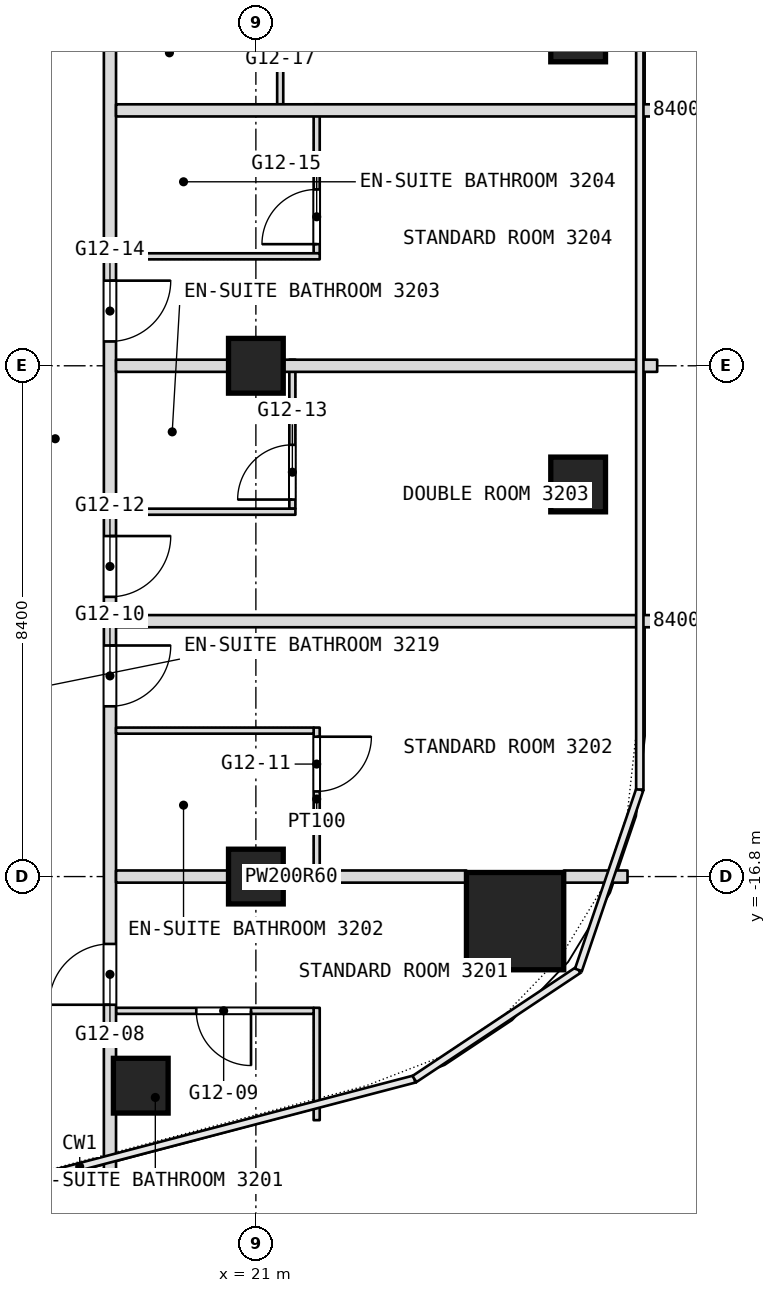
"""IFC4 building model, lengths in metres.
Left out: names, types, materials, properties, quantities, classifications, styles, units other than length and angle.
Written with IfcOpenShell. Run it as: python <this file> out.ifc"""

import sys

from ifc_helpers import new_model, si_unit, direction, frame, frame_2d, origin, origin_2d, place, context, subcontext, project, spatial, rectangle, extrude, element, fill, save


model = new_model("IFC4")
c1 = context("Model", 3, precision=1e-05, world=origin(), true_north=direction((0.0, 1.0)))
c2 = subcontext(c1, "Body", "Model", "MODEL_VIEW")
j1 = project(units=[si_unit("LENGTHUNIT", "METRE"), si_unit("PLANEANGLEUNIT", "RADIAN")], contexts=[c1])
p1 = place(None, origin())
s1 = spatial("IfcSite", under=j1, at=p1, CompositionType="ELEMENT")
p2 = place(p1, origin())
s2 = spatial("IfcBuilding", under=s1, at=p2, CompositionType="ELEMENT")
p3 = place(p2, frame((0.0, 0.0, 140.9)))
s3 = spatial("IfcBuildingStorey", under=s2, at=p3, CompositionType="ELEMENT", Elevation=140.9)
p4 = place(p3, frame((25.263, -17.533, 0.0), z_axis=(0.0, 0.0, 1.0), x_axis=(1.0, 0.0, 0.0)))
e1 = element("IfcColumn", 1, at=p4, inside=s3, PredefinedType="COLUMN", context=c2, shape_type="SweptSolid", body=[
    extrude(rectangle(XDim=1.6, YDim=1.6, at=origin_2d()), origin(), (0.0, 0.0, 1.0), 3.6),
])
for number, where, z_axis, x_axis in (
    (2, (21.0, -16.8, 0.0), (0.0, 0.0, 1.0), (1.0, 0.0, 0.0)),
    (3, (21.0, -8.4, 0.0), (0.0, 0.0, 1.0), (1.0, 0.0, 0.0)),
    (4, (26.3, -2.951, 0.0), (0.0, 0.0, 1.0), (1.0, 0.0, 0.0)),
    (5, (26.3, -10.352, 0.0), (0.0, 0.0, 1.0), (1.0, 0.0, 0.0)),
    (6, (19.107, -20.239, 0.0), (0.0, 0.0, 1.0), (1.0, 0.0, 0.0)),
):
    element("IfcColumn", number, at=place(p3, frame(where, z_axis=z_axis, x_axis=x_axis)), inside=s3, PredefinedType="COLUMN", context=c2, shape_type="SweptSolid", body=[
        extrude(rectangle(XDim=0.9, YDim=0.9, at=origin_2d()), origin(), (0.0, 0.0, 1.0), 3.6),
    ])
p5 = place(p3, frame((22.0, -20.806, 0.0), z_axis=(0.0, 0.0, 1.0), x_axis=(0.0, 1.0, 0.0)))
e7 = element("IfcWall", 7, at=p5, inside=s3, PredefinedType="PARTITIONING", context=c2, shape_type="SweptSolid", body=[
    extrude(rectangle(XDim=1.848, YDim=0.1, at=frame_2d((0.924, 0.0))), origin(), (0.0, 0.0, 1.0), 3.34),
])
p6 = place(p3, frame((22.0, -16.7, 0.0), z_axis=(0.0, 0.0, 1.0), x_axis=(0.0, 1.0, 0.0)))
e8 = element("IfcWall", 8, at=p6, inside=s3, PredefinedType="PARTITIONING", context=c2, shape_type="SweptSolid", body=[
    extrude(rectangle(XDim=2.35, YDim=0.1, at=frame_2d((1.175, 0.0))), origin(), (0.0, 0.0, 1.0), 3.34),
])
p7 = place(p6, frame((1.3, 0.0, 0.0)))
e9 = element("IfcOpeningElement", 9, at=p7, cuts=e8, PredefinedType="OPENING", context=c2, shape_type="SweptSolid", body=[
    extrude(rectangle(XDim=0.9, YDim=2.1, at=frame_2d((0.45, 1.05))), frame((0.0, 0.05, 0.0), z_axis=(0.0, -1.0, 0.0), x_axis=(1.0, 0.0, 0.0)), (0.0, 0.0, 1.0), 0.1),
])
p8 = place(p3, frame((22.0, -6.55, 0.0), z_axis=(0.0, 0.0, 1.0), x_axis=(0.0, 1.0, 0.0)))
e10 = element("IfcWall", 10, at=p8, inside=s3, PredefinedType="PARTITIONING", context=c2, shape_type="SweptSolid", body=[
    extrude(rectangle(XDim=2.45, YDim=0.1, at=frame_2d((1.225, 0.0))), origin(), (0.0, 0.0, 1.0), 3.34),
])
p9 = place(p8, frame((0.15, 0.0, 0.0)))
e11 = element("IfcOpeningElement", 11, at=p9, cuts=e10, PredefinedType="OPENING", context=c2, shape_type="SweptSolid", body=[
    extrude(rectangle(XDim=0.9, YDim=2.1, at=frame_2d((0.45, 1.05))), frame((0.0, 0.05, 0.0), z_axis=(0.0, -1.0, 0.0), x_axis=(1.0, 0.0, 0.0)), (0.0, 0.0, 1.0), 0.1),
])
p10 = place(p3, frame((21.6, -10.75, 0.0), z_axis=(0.0, 0.0, 1.0), x_axis=(0.0, 1.0, 0.0)))
e12 = element("IfcWall", 12, at=p10, inside=s3, PredefinedType="PARTITIONING", context=c2, shape_type="SweptSolid", body=[
    extrude(rectangle(XDim=2.45, YDim=0.1, at=frame_2d((1.225, 0.0))), origin(), (0.0, 0.0, 1.0), 3.34),
])
p11 = place(p10, frame((0.15, 0.0, 0.0)))
e13 = element("IfcOpeningElement", 13, at=p11, cuts=e12, PredefinedType="OPENING", context=c2, shape_type="SweptSolid", body=[
    extrude(rectangle(XDim=0.9, YDim=2.1, at=frame_2d((0.45, 1.05))), frame((0.0, 0.05, 0.0), z_axis=(0.0, -1.0, 0.0), x_axis=(1.0, 0.0, 0.0)), (0.0, 0.0, 1.0), 0.1),
])
p12 = place(p3, frame((21.4, -4.1, 0.0), z_axis=(0.0, 0.0, 1.0), x_axis=(0.0, 1.0, 0.0)))
e14 = element("IfcWall", 14, at=p12, inside=s3, PredefinedType="PARTITIONING", context=c2, shape_type="SweptSolid", body=[
    extrude(rectangle(XDim=2.35, YDim=0.1, at=frame_2d((1.175, 0.0))), origin(), (0.0, 0.0, 1.0), 3.34),
])
p13 = place(p12, frame((1.3, 0.0, 0.0)))
e15 = element("IfcOpeningElement", 15, at=p13, cuts=e14, PredefinedType="OPENING", context=c2, shape_type="SweptSolid", body=[
    extrude(rectangle(XDim=0.9, YDim=2.1, at=frame_2d((0.45, 1.05))), frame((0.0, 0.05, 0.0), z_axis=(0.0, -1.0, 0.0), x_axis=(1.0, 0.0, 0.0)), (0.0, 0.0, 1.0), 0.1),
])
p14 = place(p3, frame((18.7, -19.008, 0.0), z_axis=(0.0, 0.0, 1.0), x_axis=(1.0, 0.0, 0.0)))
e16 = element("IfcWall", 16, at=p14, inside=s3, PredefinedType="PARTITIONING", context=c2, shape_type="SweptSolid", body=[
    extrude(rectangle(XDim=3.25, YDim=0.1, at=frame_2d((1.625, 0.0))), origin(), (0.0, 0.0, 1.0), 3.34),
])
p15 = place(p14, frame((1.32, 0.0, 0.0)))
e17 = element("IfcOpeningElement", 17, at=p15, cuts=e16, PredefinedType="OPENING", context=c2, shape_type="SweptSolid", body=[
    extrude(rectangle(XDim=0.9, YDim=2.1, at=frame_2d((0.45, 1.05))), frame((0.0, 0.05, 0.0), z_axis=(0.0, -1.0, 0.0), x_axis=(1.0, 0.0, 0.0)), (0.0, 0.0, 1.0), 0.1),
])
p16 = place(p3, frame((18.6, -21.708, 0.0), z_axis=(0.0, 0.0, 1.0), x_axis=(0.0, 1.0, 0.0)))
e18 = element("IfcWall", 18, at=p16, inside=s3, PredefinedType="PARTITIONING", context=c2, shape_type="SweptSolid", body=[
    extrude(rectangle(XDim=49.648, YDim=0.2, at=frame_2d((24.824, 0.0))), origin(), (0.0, 0.0, 1.0), 3.34),
])
p17 = place(p16, frame((2.8, 0.0, 0.0)))
e19 = element("IfcOpeningElement", 19, at=p17, cuts=e18, PredefinedType="OPENING", context=c2, shape_type="SweptSolid", body=[
    extrude(rectangle(XDim=1.0, YDim=2.1, at=frame_2d((0.5, 1.05))), frame((0.0, 0.1, 0.0), z_axis=(0.0, -1.0, 0.0), x_axis=(1.0, 0.0, 0.0)), (0.0, 0.0, 1.0), 0.2),
])
p18 = place(p16, frame((7.708, 0.0, 0.0)))
e20 = element("IfcOpeningElement", 20, at=p18, cuts=e18, PredefinedType="OPENING", context=c2, shape_type="SweptSolid", body=[
    extrude(rectangle(XDim=1.0, YDim=2.1, at=frame_2d((0.5, 1.05))), frame((0.0, 0.1, 0.0), z_axis=(0.0, -1.0, 0.0), x_axis=(1.0, 0.0, 0.0)), (0.0, 0.0, 1.0), 0.2),
])
p19 = place(p16, frame((9.508, 0.0, 0.0)))
e21 = element("IfcOpeningElement", 21, at=p19, cuts=e18, PredefinedType="OPENING", context=c2, shape_type="SweptSolid", body=[
    extrude(rectangle(XDim=1.0, YDim=2.1, at=frame_2d((0.5, 1.05))), frame((0.0, 0.1, 0.0), z_axis=(0.0, -1.0, 0.0), x_axis=(1.0, 0.0, 0.0)), (0.0, 0.0, 1.0), 0.2),
])
p20 = place(p16, frame((13.708, 0.0, 0.0)))
e22 = element("IfcOpeningElement", 22, at=p20, cuts=e18, PredefinedType="OPENING", context=c2, shape_type="SweptSolid", body=[
    extrude(rectangle(XDim=1.0, YDim=2.1, at=frame_2d((0.5, 1.05))), frame((0.0, 0.1, 0.0), z_axis=(0.0, -1.0, 0.0), x_axis=(1.0, 0.0, 0.0)), (0.0, 0.0, 1.0), 0.2),
])
p21 = place(p16, frame((20.308, 0.0, 0.0)))
e23 = element("IfcOpeningElement", 23, at=p21, cuts=e18, PredefinedType="OPENING", context=c2, shape_type="SweptSolid", body=[
    extrude(rectangle(XDim=1.0, YDim=2.1, at=frame_2d((0.5, 1.05))), frame((0.0, 0.1, 0.0), z_axis=(0.0, -1.0, 0.0), x_axis=(1.0, 0.0, 0.0)), (0.0, 0.0, 1.0), 0.2),
])
p22 = place(p16, frame((24.508, 0.0, 0.0)))
e24 = element("IfcOpeningElement", 24, at=p22, cuts=e18, PredefinedType="OPENING", context=c2, shape_type="SweptSolid", body=[
    extrude(rectangle(XDim=1.0, YDim=2.1, at=frame_2d((0.5, 1.05))), frame((0.0, 0.1, 0.0), z_axis=(0.0, -1.0, 0.0), x_axis=(1.0, 0.0, 0.0)), (0.0, 0.0, 1.0), 0.2),
])
p23 = place(p16, frame((26.308, 0.0, 0.0)))
e25 = element("IfcOpeningElement", 25, at=p23, cuts=e18, PredefinedType="OPENING", context=c2, shape_type="SweptSolid", body=[
    extrude(rectangle(XDim=1.0, YDim=2.1, at=frame_2d((0.5, 1.05))), frame((0.0, 0.1, 0.0), z_axis=(0.0, -1.0, 0.0), x_axis=(1.0, 0.0, 0.0)), (0.0, 0.0, 1.0), 0.2),
])
p24 = place(p16, frame((30.508, 0.0, 0.0)))
e26 = element("IfcOpeningElement", 26, at=p24, cuts=e18, PredefinedType="OPENING", context=c2, shape_type="SweptSolid", body=[
    extrude(rectangle(XDim=1.0, YDim=2.1, at=frame_2d((0.5, 1.05))), frame((0.0, 0.1, 0.0), z_axis=(0.0, -1.0, 0.0), x_axis=(1.0, 0.0, 0.0)), (0.0, 0.0, 1.0), 0.2),
])
p25 = place(p16, frame((37.108, 0.0, 0.0)))
e27 = element("IfcOpeningElement", 27, at=p25, cuts=e18, PredefinedType="OPENING", context=c2, shape_type="SweptSolid", body=[
    extrude(rectangle(XDim=1.0, YDim=2.1, at=frame_2d((0.5, 1.05))), frame((0.0, 0.1, 0.0), z_axis=(0.0, -1.0, 0.0), x_axis=(1.0, 0.0, 0.0)), (0.0, 0.0, 1.0), 0.2),
])
p26 = place(p16, frame((43.558, 0.0, 0.0)))
e28 = element("IfcOpeningElement", 28, at=p26, cuts=e18, PredefinedType="OPENING", context=c2, shape_type="SweptSolid", body=[
    extrude(rectangle(XDim=1.1, YDim=2.1, at=frame_2d((0.55, 1.05))), frame((0.0, 0.1, 0.0), z_axis=(0.0, -1.0, 0.0), x_axis=(1.0, 0.0, 0.0)), (0.0, 0.0, 1.0), 0.2),
])
p27 = place(p3, frame((18.7, -16.8, 0.0), z_axis=(0.0, 0.0, 1.0), x_axis=(1.0, 0.0, 0.0)))
e29 = element("IfcWall", 29, at=p27, inside=s3, PredefinedType="PARTITIONING", context=c2, shape_type="SweptSolid", body=[
    extrude(rectangle(XDim=5.763, YDim=0.2, at=frame_2d((2.881, 0.0))), origin(), (0.0, 0.0, 1.0), 2.89),
])
p28 = place(p3, frame((26.063, -16.8, 0.0), z_axis=(0.0, 0.0, 1.0), x_axis=(1.0, 0.0, 0.0)))
e30 = element("IfcWall", 30, at=p28, inside=s3, PredefinedType="PARTITIONING", context=c2, shape_type="SweptSolid", body=[
    extrude(rectangle(XDim=1.049, YDim=0.2, at=frame_2d((0.524, 0.0))), origin(), (0.0, 0.0, 1.0), 3.34),
])
p29 = place(p3, frame((18.7, -14.4, 0.0), z_axis=(0.0, 0.0, 1.0), x_axis=(1.0, 0.0, 0.0)))
e31 = element("IfcWall", 31, at=p29, inside=s3, PredefinedType="PARTITIONING", context=c2, shape_type="SweptSolid", body=[
    extrude(rectangle(XDim=3.25, YDim=0.1, at=frame_2d((1.625, 0.0))), origin(), (0.0, 0.0, 1.0), 3.34),
])
p30 = place(p3, frame((18.7, -12.6, 0.0), z_axis=(0.0, 0.0, 1.0), x_axis=(1.0, 0.0, 0.0)))
e32 = element("IfcWall", 32, at=p30, inside=s3, PredefinedType="PARTITIONING", context=c2, shape_type="SweptSolid", body=[
    extrude(rectangle(XDim=8.9, YDim=0.2, at=frame_2d((4.45, 0.0))), origin(), (0.0, 0.0, 1.0), 3.34),
])
p31 = place(p3, frame((18.7, -10.8, 0.0), z_axis=(0.0, 0.0, 1.0), x_axis=(1.0, 0.0, 0.0)))
e33 = element("IfcWall", 33, at=p31, inside=s3, PredefinedType="PARTITIONING", context=c2, shape_type="SweptSolid", body=[
    extrude(rectangle(XDim=2.95, YDim=0.1, at=frame_2d((1.475, 0.0))), origin(), (0.0, 0.0, 1.0), 3.34),
])
p32 = place(p3, frame((18.7, -8.4, 0.0), z_axis=(0.0, 0.0, 1.0), x_axis=(1.0, 0.0, 0.0)))
e34 = element("IfcWall", 34, at=p32, inside=s3, PredefinedType="PARTITIONING", context=c2, shape_type="SweptSolid", body=[
    extrude(rectangle(XDim=8.9, YDim=0.2, at=frame_2d((4.45, 0.0))), origin(), (0.0, 0.0, 1.0), 2.89),
])
p33 = place(p3, frame((18.7, -6.6, 0.0), z_axis=(0.0, 0.0, 1.0), x_axis=(1.0, 0.0, 0.0)))
e35 = element("IfcWall", 35, at=p33, inside=s3, PredefinedType="PARTITIONING", context=c2, shape_type="SweptSolid", body=[
    extrude(rectangle(XDim=3.35, YDim=0.1, at=frame_2d((1.675, 0.0))), origin(), (0.0, 0.0, 1.0), 3.34),
])
p34 = place(p3, frame((18.7, -4.2, 0.0), z_axis=(0.0, 0.0, 1.0), x_axis=(1.0, 0.0, 0.0)))
e36 = element("IfcWall", 36, at=p34, inside=s3, PredefinedType="PARTITIONING", context=c2, shape_type="SweptSolid", body=[
    extrude(rectangle(XDim=8.9, YDim=0.2, at=frame_2d((4.45, 0.0))), origin(), (0.0, 0.0, 1.0), 3.34),
])
p35 = place(p7, origin())
e37 = element("IfcDoor", 37, at=p35, inside=s3, OperationType="SINGLE_SWING_RIGHT", PredefinedType="DOOR", context=c2, shape_type="SweptSolid", body=[
    extrude(rectangle(XDim=0.9, YDim=2.1, at=frame_2d((0.45, 1.05))), frame((0.0, 0.025, 0.0), z_axis=(0.0, -1.0, 0.0), x_axis=(1.0, 0.0, 0.0)), (0.0, 0.0, 1.0), 0.05),
])
fill(e9, e37)
p36 = place(p9, origin())
e38 = element("IfcDoor", 38, at=p36, inside=s3, OperationType="SINGLE_SWING_LEFT", PredefinedType="DOOR", context=c2, shape_type="SweptSolid", body=[
    extrude(rectangle(XDim=0.9, YDim=2.1, at=frame_2d((0.45, 1.05))), frame((0.0, 0.025, 0.0), z_axis=(0.0, -1.0, 0.0), x_axis=(1.0, 0.0, 0.0)), (0.0, 0.0, 1.0), 0.05),
])
fill(e11, e38)
p37 = place(p11, origin())
e39 = element("IfcDoor", 39, at=p37, inside=s3, OperationType="SINGLE_SWING_LEFT", PredefinedType="DOOR", context=c2, shape_type="SweptSolid", body=[
    extrude(rectangle(XDim=0.9, YDim=2.1, at=frame_2d((0.45, 1.05))), frame((0.0, 0.025, 0.0), z_axis=(0.0, -1.0, 0.0), x_axis=(1.0, 0.0, 0.0)), (0.0, 0.0, 1.0), 0.05),
])
fill(e13, e39)
p38 = place(p15, origin())
e40 = element("IfcDoor", 40, at=p38, inside=s3, OperationType="SINGLE_SWING_RIGHT", PredefinedType="DOOR", context=c2, shape_type="SweptSolid", body=[
    extrude(rectangle(XDim=0.9, YDim=2.1, at=frame_2d((0.45, 1.05))), frame((0.0, 0.025, 0.0), z_axis=(0.0, -1.0, 0.0), x_axis=(1.0, 0.0, 0.0)), (0.0, 0.0, 1.0), 0.05),
])
fill(e17, e40)
p39 = place(p17, origin())
e41 = element("IfcDoor", 41, at=p39, inside=s3, OperationType="SINGLE_SWING_RIGHT", PredefinedType="DOOR", context=c2, shape_type="SweptSolid", body=[
    extrude(rectangle(XDim=1.0, YDim=2.1, at=frame_2d((0.5, 1.05))), frame((0.0, 0.025, 0.0), z_axis=(0.0, -1.0, 0.0), x_axis=(1.0, 0.0, 0.0)), (0.0, 0.0, 1.0), 0.05),
])
fill(e19, e41)
p40 = place(p18, origin())
e42 = element("IfcDoor", 42, at=p40, inside=s3, OperationType="SINGLE_SWING_RIGHT", PredefinedType="DOOR", context=c2, shape_type="SweptSolid", body=[
    extrude(rectangle(XDim=1.0, YDim=2.1, at=frame_2d((0.5, 1.05))), frame((0.0, 0.025, 0.0), z_axis=(0.0, -1.0, 0.0), x_axis=(1.0, 0.0, 0.0)), (0.0, 0.0, 1.0), 0.05),
])
fill(e20, e42)
p41 = place(p19, origin())
e43 = element("IfcDoor", 43, at=p41, inside=s3, OperationType="SINGLE_SWING_RIGHT", PredefinedType="DOOR", context=c2, shape_type="SweptSolid", body=[
    extrude(rectangle(XDim=1.0, YDim=2.1, at=frame_2d((0.5, 1.05))), frame((0.0, 0.025, 0.0), z_axis=(0.0, -1.0, 0.0), x_axis=(1.0, 0.0, 0.0)), (0.0, 0.0, 1.0), 0.05),
])
fill(e21, e43)
p42 = place(p20, origin())
e44 = element("IfcDoor", 44, at=p42, inside=s3, OperationType="SINGLE_SWING_RIGHT", PredefinedType="DOOR", context=c2, shape_type="SweptSolid", body=[
    extrude(rectangle(XDim=1.0, YDim=2.1, at=frame_2d((0.5, 1.05))), frame((0.0, 0.025, 0.0), z_axis=(0.0, -1.0, 0.0), x_axis=(1.0, 0.0, 0.0)), (0.0, 0.0, 1.0), 0.05),
])
fill(e22, e44)
save(model, sys.argv[1])
